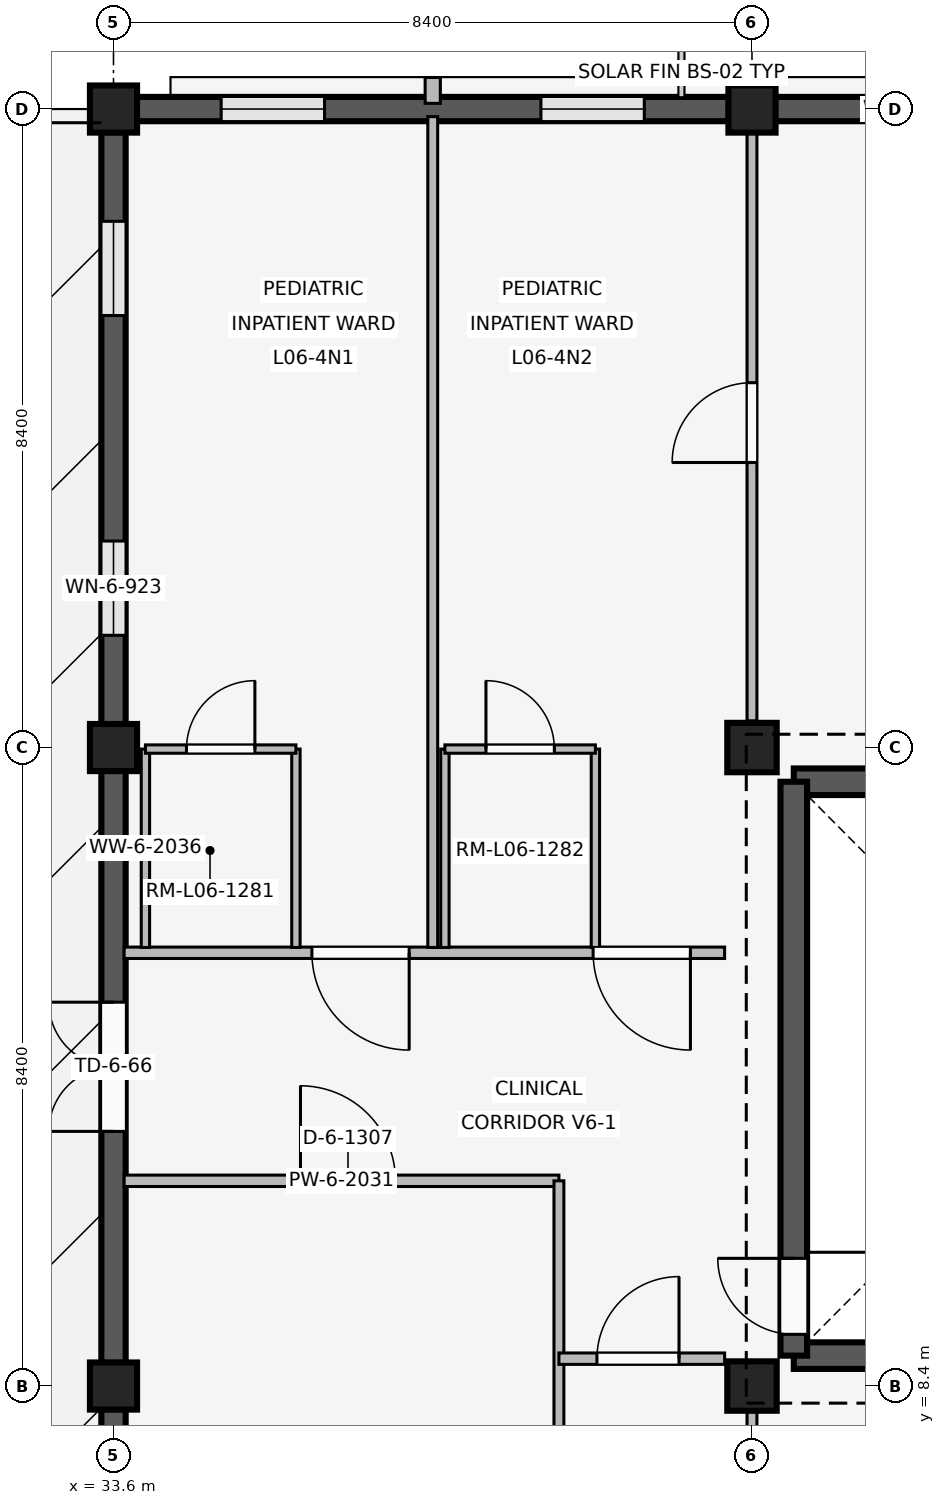
"""IFC4 building model, lengths in metres.
Left out: names, types, materials, properties, quantities, classifications, styles, units other than length and angle.
Written with IfcOpenShell. Run it as: python <this file> out.ifc"""

import sys

from ifc_helpers import new_model, si_unit, direction, frame, frame_2d, origin, origin_2d, place, context, subcontext, project, spatial, rectangle, extrude, element, fill, save


model = new_model("IFC4")
c1 = context("Model", 3, precision=1e-05, world=origin(), true_north=direction((0.0, 1.0)))
c2 = subcontext(c1, "Body", "Model", "MODEL_VIEW")
j1 = project(units=[si_unit("LENGTHUNIT", "METRE"), si_unit("PLANEANGLEUNIT", "RADIAN")], contexts=[c1])
p1 = place(None, origin())
s1 = spatial("IfcSite", under=j1, at=p1, CompositionType="ELEMENT")
p2 = place(p1, origin())
s2 = spatial("IfcBuilding", under=s1, at=p2, CompositionType="ELEMENT")
p3 = place(p2, frame((0.0, 0.0, 24.6)))
s3 = spatial("IfcBuildingStorey", under=s2, at=p3, CompositionType="ELEMENT", Elevation=24.6)
for number, where, z_axis, x_axis in (
    (1, (33.6, 8.4, 0.0), (0.0, 0.0, 1.0), (1.0, 0.0, 0.0)),
    (2, (33.6, 16.8, 0.0), (0.0, 0.0, 1.0), (1.0, 0.0, 0.0)),
    (3, (33.6, 25.2, 0.0), (0.0, 0.0, 1.0), (1.0, 0.0, 0.0)),
):
    element("IfcColumn", number, at=place(p3, frame(where, z_axis=z_axis, x_axis=x_axis)), inside=s3, PredefinedType="COLUMN", context=c2, shape_type="SweptSolid", body=[
        extrude(rectangle(XDim=0.62, YDim=0.62, at=origin_2d()), origin(), (0.0, 0.0, 1.0), 4.2),
    ])
for number, where, z_axis, x_axis in (
    (4, (42.0, 8.4, 0.0), (0.0, 0.0, 1.0), (1.0, 0.0, 0.0)),
    (5, (42.0, 16.8, 0.0), (0.0, 0.0, 1.0), (1.0, 0.0, 0.0)),
):
    element("IfcColumn", number, at=place(p3, frame(where, z_axis=z_axis, x_axis=x_axis)), inside=s3, PredefinedType="COLUMN", context=c2, shape_type="SweptSolid", body=[
        extrude(rectangle(XDim=0.65, YDim=0.65, at=origin_2d()), origin(), (0.0, 0.0, 1.0), 4.2),
    ])
p4 = place(p3, frame((42.0, 25.2, 0.0), z_axis=(0.0, 0.0, 1.0), x_axis=(1.0, 0.0, 0.0)))
e6 = element("IfcColumn", 6, at=p4, inside=s3, PredefinedType="COLUMN", context=c2, shape_type="SweptSolid", body=[
    extrude(rectangle(XDim=0.62, YDim=0.62, at=origin_2d()), origin(), (0.0, 0.0, 1.0), 4.2),
])
p5 = place(p3, frame((33.6, 0.305, 0.0), z_axis=(0.0, 0.0, 1.0), x_axis=(0.0, 1.0, 0.0)))
e7 = element("IfcWall", 7, at=p5, inside=s3, PredefinedType="SOLIDWALL", context=c2, shape_type="SweptSolid", body=[
    extrude(rectangle(XDim=7.79, YDim=0.32, at=frame_2d((3.895, 0.0))), origin(), (0.0, 0.0, 1.0), 3.34),
])
p6 = place(p5, frame((1.112, 0.0, 0.85)))
e8 = element("IfcOpeningElement", 8, at=p6, cuts=e7, PredefinedType="OPENING", context=c2, shape_type="SweptSolid", body=[
    extrude(rectangle(XDim=1.36, YDim=1.42, at=frame_2d((0.68, 0.71))), frame((0.0, 0.17, 0.0), z_axis=(0.0, -1.0, 0.0), x_axis=(1.0, 0.0, 0.0)), (0.0, 0.0, 1.0), 0.34),
])
p7 = place(p5, frame((5.318, 0.0, 0.85)))
e9 = element("IfcOpeningElement", 9, at=p7, cuts=e7, PredefinedType="OPENING", context=c2, shape_type="SweptSolid", body=[
    extrude(rectangle(XDim=1.36, YDim=1.42, at=frame_2d((0.68, 0.71))), frame((0.0, 0.17, 0.0), z_axis=(0.0, -1.0, 0.0), x_axis=(1.0, 0.0, 0.0)), (0.0, 0.0, 1.0), 0.34),
])
p8 = place(p3, frame((33.6, 8.705, 0.0), z_axis=(0.0, 0.0, 1.0), x_axis=(0.0, 1.0, 0.0)))
e10 = element("IfcWall", 10, at=p8, inside=s3, PredefinedType="SOLIDWALL", context=c2, shape_type="SweptSolid", body=[
    extrude(rectangle(XDim=7.79, YDim=0.32, at=frame_2d((3.895, 0.0))), origin(), (0.0, 0.0, 1.0), 3.34),
])
p9 = place(p8, frame((3.045, 0.0, 0.0)))
e11 = element("IfcOpeningElement", 11, at=p9, cuts=e10, PredefinedType="OPENING", context=c2, shape_type="SweptSolid", body=[
    extrude(rectangle(XDim=1.7, YDim=2.3, at=frame_2d((0.85, 1.15))), frame((0.0, 0.17, 0.0), z_axis=(0.0, -1.0, 0.0), x_axis=(1.0, 0.0, 0.0)), (0.0, 0.0, 1.0), 0.34),
])
p10 = place(p3, frame((33.905, 25.2, 0.0), z_axis=(0.0, 0.0, 1.0), x_axis=(1.0, 0.0, 0.0)))
e12 = element("IfcWall", 12, at=p10, inside=s3, PredefinedType="SOLIDWALL", context=c2, shape_type="SweptSolid", body=[
    extrude(rectangle(XDim=7.79, YDim=0.32, at=frame_2d((3.895, 0.0))), origin(), (0.0, 0.0, 1.0), 3.34),
])
p11 = place(p10, frame((1.112, 0.0, 0.85)))
e13 = element("IfcOpeningElement", 13, at=p11, cuts=e12, PredefinedType="OPENING", context=c2, shape_type="SweptSolid", body=[
    extrude(rectangle(XDim=1.36, YDim=1.42, at=frame_2d((0.68, 0.71))), frame((0.0, 0.17, 0.0), z_axis=(0.0, -1.0, 0.0), x_axis=(1.0, 0.0, 0.0)), (0.0, 0.0, 1.0), 0.34),
])
p12 = place(p10, frame((5.318, 0.0, 0.85)))
e14 = element("IfcOpeningElement", 14, at=p12, cuts=e12, PredefinedType="OPENING", context=c2, shape_type="SweptSolid", body=[
    extrude(rectangle(XDim=1.36, YDim=1.42, at=frame_2d((0.68, 0.71))), frame((0.0, 0.17, 0.0), z_axis=(0.0, -1.0, 0.0), x_axis=(1.0, 0.0, 0.0)), (0.0, 0.0, 1.0), 0.34),
])
p13 = place(p3, frame((37.8, 25.275, 0.0), z_axis=(0.0, 0.0, 1.0), x_axis=(0.0, 1.0, 0.0)))
e15 = element("IfcWall", 15, at=p13, inside=s3, PredefinedType="ELEMENTEDWALL", context=c2, shape_type="SweptSolid", body=[
    extrude(rectangle(XDim=0.34, YDim=0.2, at=frame_2d((0.17, 0.0))), origin(), (0.0, 0.0, 1.0), 3.32),
])
p14 = place(p3, frame((33.6, 17.105, 0.0), z_axis=(0.0, 0.0, 1.0), x_axis=(0.0, 1.0, 0.0)))
e16 = element("IfcWall", 16, at=p14, inside=s3, PredefinedType="SOLIDWALL", context=c2, shape_type="SweptSolid", body=[
    extrude(rectangle(XDim=7.79, YDim=0.32, at=frame_2d((3.895, 0.0))), origin(), (0.0, 0.0, 1.0), 3.34),
])
p15 = place(p14, frame((1.172, 0.0, 0.85)))
e17 = element("IfcOpeningElement", 17, at=p15, cuts=e16, PredefinedType="OPENING", context=c2, shape_type="SweptSolid", body=[
    extrude(rectangle(XDim=1.24, YDim=1.34, at=frame_2d((0.62, 0.67))), frame((0.0, 0.17, 0.0), z_axis=(0.0, -1.0, 0.0), x_axis=(1.0, 0.0, 0.0)), (0.0, 0.0, 1.0), 0.34),
])
p16 = place(p14, frame((5.378, 0.0, 0.85)))
e18 = element("IfcOpeningElement", 18, at=p16, cuts=e16, PredefinedType="OPENING", context=c2, shape_type="SweptSolid", body=[
    extrude(rectangle(XDim=1.24, YDim=1.34, at=frame_2d((0.62, 0.67))), frame((0.0, 0.17, 0.0), z_axis=(0.0, -1.0, 0.0), x_axis=(1.0, 0.0, 0.0)), (0.0, 0.0, 1.0), 0.34),
])
p17 = place(p3, frame((42.305, 25.2, 0.0), z_axis=(0.0, 0.0, 1.0), x_axis=(1.0, 0.0, 0.0)))
e19 = element("IfcWall", 19, at=p17, inside=s3, PredefinedType="SOLIDWALL", context=c2, shape_type="SweptSolid", body=[
    extrude(rectangle(XDim=7.79, YDim=0.32, at=frame_2d((3.895, 0.0))), origin(), (0.0, 0.0, 1.0), 3.34),
])
p18 = place(p17, frame((1.152, 0.0, 0.85)))
e20 = element("IfcOpeningElement", 20, at=p18, cuts=e19, PredefinedType="OPENING", context=c2, shape_type="SweptSolid", body=[
    extrude(rectangle(XDim=1.28, YDim=1.38, at=frame_2d((0.64, 0.69))), frame((0.0, 0.17, 0.0), z_axis=(0.0, -1.0, 0.0), x_axis=(1.0, 0.0, 0.0)), (0.0, 0.0, 1.0), 0.34),
])
p19 = place(p17, frame((5.358, 0.0, 0.85)))
e21 = element("IfcOpeningElement", 21, at=p19, cuts=e19, PredefinedType="OPENING", context=c2, shape_type="SweptSolid", body=[
    extrude(rectangle(XDim=1.28, YDim=1.38, at=frame_2d((0.64, 0.69))), frame((0.0, 0.17, 0.0), z_axis=(0.0, -1.0, 0.0), x_axis=(1.0, 0.0, 0.0)), (0.0, 0.0, 1.0), 0.34),
])
p20 = place(p3, frame((42.55, 8.8, 0.0), z_axis=(0.0, 0.0, 1.0), x_axis=(1.0, 0.0, 0.0)))
e22 = element("IfcWall", 22, at=p20, inside=s3, PredefinedType="SHEAR", context=c2, shape_type="SweptSolid", body=[
    extrude(rectangle(XDim=7.5, YDim=0.35, at=frame_2d((3.75, 0.0))), origin(), (0.0, 0.0, 1.0), 3.92),
])
p21 = place(p20, frame((4.85, 0.0, 0.0)))
e23 = element("IfcOpeningElement", 23, at=p21, cuts=e22, PredefinedType="OPENING", context=c2, shape_type="SweptSolid", body=[
    extrude(rectangle(XDim=1.2, YDim=2.2, at=frame_2d((0.6, 1.1))), frame((0.0, 0.185, 0.0), z_axis=(0.0, -1.0, 0.0), x_axis=(1.0, 0.0, 0.0)), (0.0, 0.0, 1.0), 0.37),
])
p22 = place(p3, frame((42.55, 16.35, 0.0), z_axis=(0.0, 0.0, 1.0), x_axis=(1.0, 0.0, 0.0)))
e24 = element("IfcWall", 24, at=p22, inside=s3, PredefinedType="SHEAR", context=c2, shape_type="SweptSolid", body=[
    extrude(rectangle(XDim=7.5, YDim=0.35, at=frame_2d((3.75, 0.0))), origin(), (0.0, 0.0, 1.0), 3.92),
])
p23 = place(p3, frame((42.55, 8.8, 0.0), z_axis=(0.0, 0.0, 1.0), x_axis=(0.0, 1.0, 0.0)))
e25 = element("IfcWall", 25, at=p23, inside=s3, PredefinedType="SHEAR", context=c2, shape_type="SweptSolid", body=[
    extrude(rectangle(XDim=7.55, YDim=0.35, at=frame_2d((3.775, 0.0))), origin(), (0.0, 0.0, 1.0), 3.92),
])
p24 = place(p23, frame((0.28, 0.0, 0.0)))
e26 = element("IfcOpeningElement", 26, at=p24, cuts=e25, PredefinedType="OPENING", context=c2, shape_type="SweptSolid", body=[
    extrude(rectangle(XDim=1.0, YDim=2.15, at=frame_2d((0.5, 1.075))), frame((0.0, 0.185, 0.0), z_axis=(0.0, -1.0, 0.0), x_axis=(1.0, 0.0, 0.0)), (0.0, 0.0, 1.0), 0.37),
])
p25 = place(p3, frame((33.74, 11.1, 0.0), z_axis=(0.0, 0.0, 1.0), x_axis=(1.0, 0.0, 0.0)))
e27 = element("IfcWall", 27, at=p25, inside=s3, PredefinedType="PARTITIONING", context=c2, shape_type="SweptSolid", body=[
    extrude(rectangle(XDim=5.72, YDim=0.15, at=frame_2d((2.86, 0.0))), origin(), (0.0, 0.0, 1.0), 3.32),
])
p26 = place(p25, frame((2.32, 0.0, 0.0)))
e28 = element("IfcOpeningElement", 28, at=p26, cuts=e27, PredefinedType="OPENING", context=c2, shape_type="SweptSolid", body=[
    extrude(rectangle(XDim=1.25, YDim=2.2, at=frame_2d((0.625, 1.1))), frame((0.0, 0.085, 0.0), z_axis=(0.0, -1.0, 0.0), x_axis=(1.0, 0.0, 0.0)), (0.0, 0.0, 1.0), 0.17),
])
p27 = place(p3, frame((39.46, 0.16, 0.0), z_axis=(0.0, 0.0, 1.0), x_axis=(0.0, 1.0, 0.0)))
e29 = element("IfcWall", 29, at=p27, inside=s3, PredefinedType="PARTITIONING", context=c2, shape_type="SweptSolid", body=[
    extrude(rectangle(XDim=10.94, YDim=0.13, at=frame_2d((5.47, 0.0))), origin(), (0.0, 0.0, 1.0), 3.32),
])
p28 = place(p3, frame((39.46, 8.76, 0.0), z_axis=(0.0, 0.0, 1.0), x_axis=(1.0, 0.0, 0.0)))
e30 = element("IfcWall", 30, at=p28, inside=s3, PredefinedType="PARTITIONING", context=c2, shape_type="SweptSolid", body=[
    extrude(rectangle(XDim=2.18, YDim=0.15, at=frame_2d((1.09, 0.0))), origin(), (0.0, 0.0, 1.0), 3.32),
])
p29 = place(p28, frame((0.5, 0.0, 0.0)))
e31 = element("IfcOpeningElement", 31, at=p29, cuts=e30, PredefinedType="OPENING", context=c2, shape_type="SweptSolid", body=[
    extrude(rectangle(XDim=1.08, YDim=2.15, at=frame_2d((0.54, 1.075))), frame((0.0, 0.085, 0.0), z_axis=(0.0, -1.0, 0.0), x_axis=(1.0, 0.0, 0.0)), (0.0, 0.0, 1.0), 0.17),
])
p30 = place(p3, frame((41.64, 14.1, 0.0), z_axis=(0.0, 0.0, 1.0), x_axis=(-1.0, 0.0, 0.0)))
e32 = element("IfcWall", 32, at=p30, inside=s3, PredefinedType="PARTITIONING", context=c2, shape_type="SweptSolid", body=[
    extrude(rectangle(XDim=7.9, YDim=0.15, at=frame_2d((3.95, 0.0))), origin(), (0.0, 0.0, 1.0), 3.32),
])
p31 = place(p30, frame((0.45, 0.0, 0.0)))
e33 = element("IfcOpeningElement", 33, at=p31, cuts=e32, PredefinedType="OPENING", context=c2, shape_type="SweptSolid", body=[
    extrude(rectangle(XDim=1.28, YDim=2.2, at=frame_2d((0.64, 1.1))), frame((0.0, 0.085, 0.0), z_axis=(0.0, -1.0, 0.0), x_axis=(1.0, 0.0, 0.0)), (0.0, 0.0, 1.0), 0.17),
])
p32 = place(p30, frame((4.15, 0.0, 0.0)))
e34 = element("IfcOpeningElement", 34, at=p32, cuts=e32, PredefinedType="OPENING", context=c2, shape_type="SweptSolid", body=[
    extrude(rectangle(XDim=1.28, YDim=2.2, at=frame_2d((0.64, 1.1))), frame((0.0, 0.085, 0.0), z_axis=(0.0, -1.0, 0.0), x_axis=(1.0, 0.0, 0.0)), (0.0, 0.0, 1.0), 0.17),
])
p33 = place(p3, frame((37.8, 14.17, 0.0), z_axis=(0.0, 0.0, 1.0), x_axis=(0.0, 1.0, 0.0)))
e35 = element("IfcWall", 35, at=p33, inside=s3, PredefinedType="PARTITIONING", context=c2, shape_type="SweptSolid", body=[
    extrude(rectangle(XDim=10.93, YDim=0.13, at=frame_2d((5.465, 0.0))), origin(), (0.0, 0.0, 1.0), 3.32),
])
for number, where, z_axis, x_axis in (
    (36, (34.02, 14.17, 0.0), (0.0, 0.0, 1.0), (0.0, 1.0, 0.0)),
    (37, (36.0, 14.17, 0.0), (0.0, 0.0, 1.0), (0.0, 1.0, 0.0)),
):
    element("IfcWall", number, at=place(p3, frame(where, z_axis=z_axis, x_axis=x_axis)), inside=s3, PredefinedType="PARTITIONING", context=c2, shape_type="SweptSolid", body=[
        extrude(rectangle(XDim=2.61, YDim=0.11, at=frame_2d((1.305, 0.0))), origin(), (0.0, 0.0, 1.0), 3.32),
    ])
p34 = place(p3, frame((34.02, 16.78, 0.0), z_axis=(0.0, 0.0, 1.0), x_axis=(1.0, 0.0, 0.0)))
e38 = element("IfcWall", 38, at=p34, inside=s3, PredefinedType="PARTITIONING", context=c2, shape_type="SweptSolid", body=[
    extrude(rectangle(XDim=1.98, YDim=0.11, at=frame_2d((0.99, 0.0))), origin(), (0.0, 0.0, 1.0), 3.32),
])
p35 = place(p34, frame((0.54, 0.0, 0.0)))
e39 = element("IfcOpeningElement", 39, at=p35, cuts=e38, PredefinedType="OPENING", context=c2, shape_type="SweptSolid", body=[
    extrude(rectangle(XDim=0.9, YDim=2.1, at=frame_2d((0.45, 1.05))), frame((0.0, 0.065, 0.0), z_axis=(0.0, -1.0, 0.0), x_axis=(1.0, 0.0, 0.0)), (0.0, 0.0, 1.0), 0.13),
])
for number, where, z_axis, x_axis in (
    (40, (37.96, 14.17, 0.0), (0.0, 0.0, 1.0), (0.0, 1.0, 0.0)),
    (41, (39.94, 14.17, 0.0), (0.0, 0.0, 1.0), (0.0, 1.0, 0.0)),
):
    element("IfcWall", number, at=place(p3, frame(where, z_axis=z_axis, x_axis=x_axis)), inside=s3, PredefinedType="PARTITIONING", context=c2, shape_type="SweptSolid", body=[
        extrude(rectangle(XDim=2.61, YDim=0.11, at=frame_2d((1.305, 0.0))), origin(), (0.0, 0.0, 1.0), 3.32),
    ])
p36 = place(p3, frame((37.96, 16.78, 0.0), z_axis=(0.0, 0.0, 1.0), x_axis=(1.0, 0.0, 0.0)))
e42 = element("IfcWall", 42, at=p36, inside=s3, PredefinedType="PARTITIONING", context=c2, shape_type="SweptSolid", body=[
    extrude(rectangle(XDim=1.98, YDim=0.11, at=frame_2d((0.99, 0.0))), origin(), (0.0, 0.0, 1.0), 3.32),
])
p37 = place(p36, frame((0.54, 0.0, 0.0)))
e43 = element("IfcOpeningElement", 43, at=p37, cuts=e42, PredefinedType="OPENING", context=c2, shape_type="SweptSolid", body=[
    extrude(rectangle(XDim=0.9, YDim=2.1, at=frame_2d((0.45, 1.05))), frame((0.0, 0.065, 0.0), z_axis=(0.0, -1.0, 0.0), x_axis=(1.0, 0.0, 0.0)), (0.0, 0.0, 1.0), 0.13),
])
p38 = place(p3, frame((42.0, 0.14, 0.0), z_axis=(0.0, 0.0, 1.0), x_axis=(0.0, 1.0, 0.0)))
e44 = element("IfcWall", 44, at=p38, inside=s3, PredefinedType="PARTITIONING", context=c2, shape_type="SweptSolid", body=[
    extrude(rectangle(XDim=8.21, YDim=0.13, at=frame_2d((4.105, 0.0))), origin(), (0.0, 0.0, 1.0), 3.32),
])
p39 = place(p38, frame((3.64, 0.0, 0.0)))
e45 = element("IfcOpeningElement", 45, at=p39, cuts=e44, PredefinedType="OPENING", context=c2, shape_type="SweptSolid", body=[
    extrude(rectangle(XDim=1.08, YDim=2.15, at=frame_2d((0.54, 1.075))), frame((0.0, 0.075, 0.0), z_axis=(0.0, -1.0, 0.0), x_axis=(1.0, 0.0, 0.0)), (0.0, 0.0, 1.0), 0.15),
])
p40 = place(p3, frame((42.0, 17.15, 0.0), z_axis=(0.0, 0.0, 1.0), x_axis=(0.0, 1.0, 0.0)))
e46 = element("IfcWall", 46, at=p40, inside=s3, PredefinedType="PARTITIONING", context=c2, shape_type="SweptSolid", body=[
    extrude(rectangle(XDim=7.91, YDim=0.13, at=frame_2d((3.955, 0.0))), origin(), (0.0, 0.0, 1.0), 3.32),
])
p41 = place(p40, frame((3.4, 0.0, 0.0)))
e47 = element("IfcOpeningElement", 47, at=p41, cuts=e46, PredefinedType="OPENING", context=c2, shape_type="SweptSolid", body=[
    extrude(rectangle(XDim=1.05, YDim=2.2, at=frame_2d((0.525, 1.1))), frame((0.0, 0.075, 0.0), z_axis=(0.0, -1.0, 0.0), x_axis=(1.0, 0.0, 0.0)), (0.0, 0.0, 1.0), 0.15),
])
p42 = place(p9, origin())
e48 = element("IfcDoor", 48, at=p42, inside=s3, OperationType="DOUBLE_SWING_LEFT", PredefinedType="DOOR", context=c2, shape_type="SweptSolid", body=[
    extrude(rectangle(XDim=1.7, YDim=2.3, at=frame_2d((0.85, 1.15))), frame((0.0, 0.025, 0.0), z_axis=(0.0, -1.0, 0.0), x_axis=(1.0, 0.0, 0.0)), (0.0, 0.0, 1.0), 0.05),
])
fill(e11, e48)
p43 = place(p11, origin())
e49 = element("IfcWindow", 49, at=p43, inside=s3, PartitioningType="SINGLE_PANEL", PredefinedType="WINDOW", context=c2, shape_type="SweptSolid", body=[
    extrude(rectangle(XDim=1.36, YDim=1.42, at=frame_2d((0.68, 0.71))), frame((0.0, 0.03, 0.0), z_axis=(0.0, -1.0, 0.0), x_axis=(1.0, 0.0, 0.0)), (0.0, 0.0, 1.0), 0.06),
])
fill(e13, e49)
p44 = place(p12, origin())
e50 = element("IfcWindow", 50, at=p44, inside=s3, PartitioningType="SINGLE_PANEL", PredefinedType="WINDOW", context=c2, shape_type="SweptSolid", body=[
    extrude(rectangle(XDim=1.36, YDim=1.42, at=frame_2d((0.68, 0.71))), frame((0.0, 0.03, 0.0), z_axis=(0.0, -1.0, 0.0), x_axis=(1.0, 0.0, 0.0)), (0.0, 0.0, 1.0), 0.06),
])
fill(e14, e50)
p45 = place(p15, origin())
e51 = element("IfcWindow", 51, at=p45, inside=s3, PartitioningType="SINGLE_PANEL", PredefinedType="WINDOW", context=c2, shape_type="SweptSolid", body=[
    extrude(rectangle(XDim=1.24, YDim=1.34, at=frame_2d((0.62, 0.67))), frame((0.0, 0.03, 0.0), z_axis=(0.0, -1.0, 0.0), x_axis=(1.0, 0.0, 0.0)), (0.0, 0.0, 1.0), 0.06),
])
fill(e17, e51)
p46 = place(p16, origin())
e52 = element("IfcWindow", 52, at=p46, inside=s3, PartitioningType="SINGLE_PANEL", PredefinedType="WINDOW", context=c2, shape_type="SweptSolid", body=[
    extrude(rectangle(XDim=1.24, YDim=1.34, at=frame_2d((0.62, 0.67))), frame((0.0, 0.03, 0.0), z_axis=(0.0, -1.0, 0.0), x_axis=(1.0, 0.0, 0.0)), (0.0, 0.0, 1.0), 0.06),
])
fill(e18, e52)
p47 = place(p18, origin())
e53 = element("IfcWindow", 53, at=p47, inside=s3, PartitioningType="SINGLE_PANEL", PredefinedType="WINDOW", context=c2, shape_type="SweptSolid", body=[
    extrude(rectangle(XDim=1.28, YDim=1.38, at=frame_2d((0.64, 0.69))), frame((0.0, 0.03, 0.0), z_axis=(0.0, -1.0, 0.0), x_axis=(1.0, 0.0, 0.0)), (0.0, 0.0, 1.0), 0.06),
])
fill(e20, e53)
p48 = place(p24, origin())
e54 = element("IfcDoor", 54, at=p48, inside=s3, OperationType="SINGLE_SWING_RIGHT", PredefinedType="DOOR", context=c2, shape_type="SweptSolid", body=[
    extrude(rectangle(XDim=1.0, YDim=2.15, at=frame_2d((0.5, 1.075))), frame((0.0, 0.025, 0.0), z_axis=(0.0, -1.0, 0.0), x_axis=(1.0, 0.0, 0.0)), (0.0, 0.0, 1.0), 0.05),
])
fill(e26, e54)
p49 = place(p26, origin())
e55 = element("IfcDoor", 55, at=p49, inside=s3, OperationType="SINGLE_SWING_LEFT", PredefinedType="DOOR", context=c2, shape_type="SweptSolid", body=[
    extrude(rectangle(XDim=1.25, YDim=2.2, at=frame_2d((0.625, 1.1))), frame((0.0, 0.025, 0.0), z_axis=(0.0, -1.0, 0.0), x_axis=(1.0, 0.0, 0.0)), (0.0, 0.0, 1.0), 0.05),
])
fill(e28, e55)
p50 = place(p29, origin())
e56 = element("IfcDoor", 56, at=p50, inside=s3, OperationType="SINGLE_SWING_RIGHT", PredefinedType="DOOR", context=c2, shape_type="SweptSolid", body=[
    extrude(rectangle(XDim=1.08, YDim=2.15, at=frame_2d((0.54, 1.075))), frame((0.0, 0.025, 0.0), z_axis=(0.0, -1.0, 0.0), x_axis=(1.0, 0.0, 0.0)), (0.0, 0.0, 1.0), 0.05),
])
fill(e31, e56)
p51 = place(p31, origin())
e57 = element("IfcDoor", 57, at=p51, inside=s3, OperationType="SINGLE_SWING_LEFT", PredefinedType="DOOR", context=c2, shape_type="SweptSolid", body=[
    extrude(rectangle(XDim=1.28, YDim=2.2, at=frame_2d((0.64, 1.1))), frame((0.0, 0.025, 0.0), z_axis=(0.0, -1.0, 0.0), x_axis=(1.0, 0.0, 0.0)), (0.0, 0.0, 1.0), 0.05),
])
fill(e33, e57)
p52 = place(p32, origin())
e58 = element("IfcDoor", 58, at=p52, inside=s3, OperationType="SINGLE_SWING_LEFT", PredefinedType="DOOR", context=c2, shape_type="SweptSolid", body=[
    extrude(rectangle(XDim=1.28, YDim=2.2, at=frame_2d((0.64, 1.1))), frame((0.0, 0.025, 0.0), z_axis=(0.0, -1.0, 0.0), x_axis=(1.0, 0.0, 0.0)), (0.0, 0.0, 1.0), 0.05),
])
fill(e34, e58)
p53 = place(p35, origin())
e59 = element("IfcDoor", 59, at=p53, inside=s3, OperationType="SINGLE_SWING_RIGHT", PredefinedType="DOOR", context=c2, shape_type="SweptSolid", body=[
    extrude(rectangle(XDim=0.9, YDim=2.1, at=frame_2d((0.45, 1.05))), frame((0.0, 0.025, 0.0), z_axis=(0.0, -1.0, 0.0), x_axis=(1.0, 0.0, 0.0)), (0.0, 0.0, 1.0), 0.05),
])
fill(e39, e59)
p54 = place(p37, origin())
e60 = element("IfcDoor", 60, at=p54, inside=s3, OperationType="SINGLE_SWING_LEFT", PredefinedType="DOOR", context=c2, shape_type="SweptSolid", body=[
    extrude(rectangle(XDim=0.9, YDim=2.1, at=frame_2d((0.45, 1.05))), frame((0.0, 0.025, 0.0), z_axis=(0.0, -1.0, 0.0), x_axis=(1.0, 0.0, 0.0)), (0.0, 0.0, 1.0), 0.05),
])
fill(e43, e60)
p55 = place(p41, origin())
e61 = element("IfcDoor", 61, at=p55, inside=s3, OperationType="SINGLE_SWING_LEFT", PredefinedType="DOOR", context=c2, shape_type="SweptSolid", body=[
    extrude(rectangle(XDim=1.05, YDim=2.2, at=frame_2d((0.525, 1.1))), frame((0.0, 0.025, 0.0), z_axis=(0.0, -1.0, 0.0), x_axis=(1.0, 0.0, 0.0)), (0.0, 0.0, 1.0), 0.05),
])
fill(e47, e61)
save(model, sys.argv[1])
